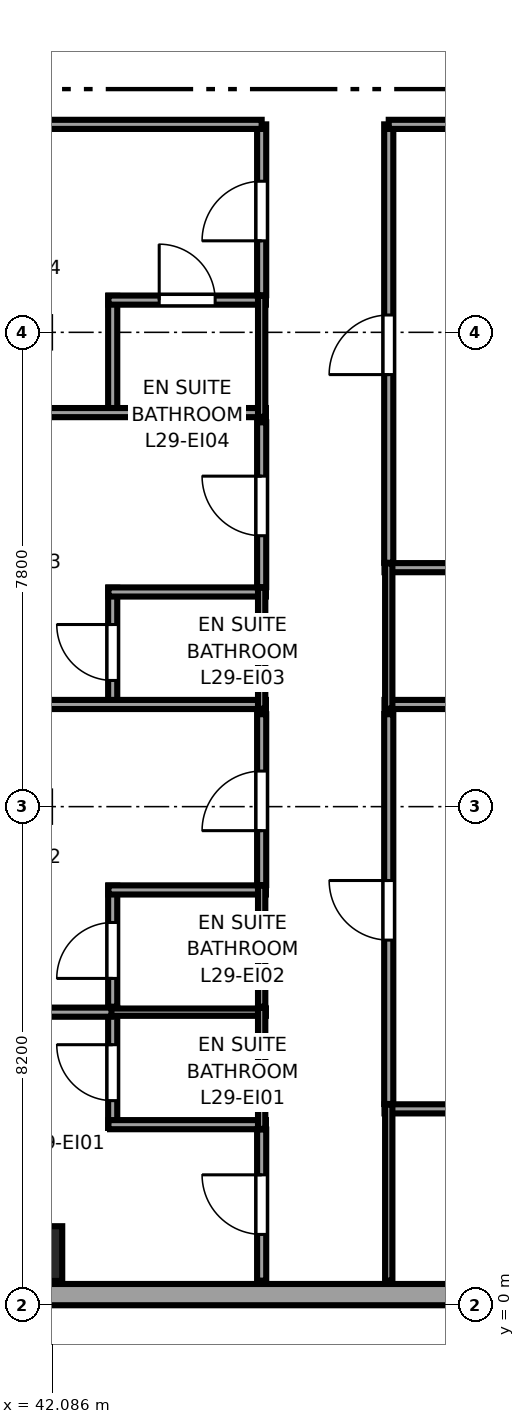
"""IFC4 building model, lengths in metres.
Left out: names, types, materials, properties, quantities, classifications, styles, units other than length and angle.
Written with IfcOpenShell. Run it as: python <this file> out.ifc"""

import sys

from ifc_helpers import new_model, si_unit, direction, frame, frame_2d, origin, origin_2d, place, context, subcontext, project, spatial, rectangle, extrude, source, transform, mapped, element, fill, save


model = new_model("IFC4")
c1 = context("Model", 3, precision=1e-05, world=origin(), true_north=direction((0.0, 1.0)))
c2 = subcontext(c1, "Body", "Model", "MODEL_VIEW")
j1 = project(units=[si_unit("LENGTHUNIT", "METRE"), si_unit("PLANEANGLEUNIT", "RADIAN")], contexts=[c1])
p1 = place(None, origin())
s1 = spatial("IfcSite", under=j1, at=p1, CompositionType="ELEMENT")
p2 = place(p1, origin())
s2 = spatial("IfcBuilding", under=s1, at=p2, CompositionType="ELEMENT")
p3 = place(p2, frame((0.0, 0.0, 115.1)))
s3 = spatial("IfcBuildingStorey", under=s2, at=p3, CompositionType="ELEMENT", Elevation=115.1)
m1 = source(origin(), c2, "Body", "SweptSolid", [
    extrude(rectangle(XDim=0.9, YDim=0.9, at=origin_2d()), origin(), (0.0, 0.0, 1.0), 3.55),
])
p4 = place(p3, frame((41.8, 0.85, 0.0), z_axis=(0.0, 0.0, 1.0), x_axis=(1.0, 0.0, 0.0)))
e1 = element("IfcColumn", 1, at=p4, inside=s3, PredefinedType="COLUMN", context=c2, shape_type="MappedRepresentation", body=[
    mapped(m1, transform((0.0, 0.0, 0.0), x_axis=(1.0, 0.0, 0.0), y_axis=(0.0, 1.0, 0.0), z_axis=(0.0, 0.0, 1.0), scale=1.0)),
])
p5 = place(p3, frame((34.375, 0.175, 0.0), z_axis=(0.0, 0.0, 1.0), x_axis=(1.0, 0.0, 0.0)))
e2 = element("IfcWall", 2, at=p5, inside=s3, PredefinedType="SOLIDWALL", context=c2, shape_type="SweptSolid", body=[
    extrude(rectangle(XDim=18.008, YDim=0.35, at=frame_2d((9.004, 0.0))), origin(), (0.0, 0.0, 1.0), 3.37),
])
p6 = place(p5, frame((1.801, 0.0, 0.68)))
e3 = element("IfcOpeningElement", 3, at=p6, cuts=e2, PredefinedType="OPENING", context=c2, shape_type="SweptSolid", body=[
    extrude(rectangle(XDim=1.8, YDim=1.85, at=frame_2d((0.9, 0.925))), frame((0.0, 0.185, 0.0), z_axis=(0.0, -1.0, 0.0), x_axis=(1.0, 0.0, 0.0)), (0.0, 0.0, 1.0), 0.37),
])
p7 = place(p5, frame((4.953, 0.0, 0.68)))
e4 = element("IfcOpeningElement", 4, at=p7, cuts=e2, PredefinedType="OPENING", context=c2, shape_type="SweptSolid", body=[
    extrude(rectangle(XDim=1.8, YDim=1.85, at=frame_2d((0.9, 0.925))), frame((0.0, 0.185, 0.0), z_axis=(0.0, -1.0, 0.0), x_axis=(1.0, 0.0, 0.0)), (0.0, 0.0, 1.0), 0.37),
])
p8 = place(p3, frame((43.08, 2.9, 0.0), z_axis=(0.0, 0.0, 1.0), x_axis=(0.0, 1.0, 0.0)))
e5 = element("IfcWall", 5, at=p8, inside=s3, PredefinedType="PARTITIONING", context=c2, shape_type="SweptSolid", body=[
    extrude(rectangle(XDim=1.99, YDim=0.15, at=frame_2d((0.995, 0.0))), origin(), (0.0, 0.0, 1.0), 3.37),
])
p9 = place(p8, frame((0.465, 0.0, 0.0)))
e6 = element("IfcOpeningElement", 6, at=p9, cuts=e5, PredefinedType="OPENING", context=c2, shape_type="SweptSolid", body=[
    extrude(rectangle(XDim=0.92, YDim=2.01, at=frame_2d((0.46, 1.005))), frame((0.0, 0.085, 0.0), z_axis=(0.0, -1.0, 0.0), x_axis=(1.0, 0.0, 0.0)), (0.0, 0.0, 1.0), 0.17),
])
p10 = place(p3, frame((43.01, 2.97, 0.0), z_axis=(0.0, 0.0, 1.0), x_axis=(1.0, 0.0, 0.0)))
e7 = element("IfcWall", 7, at=p10, inside=s3, PredefinedType="PARTITIONING", context=c2, shape_type="SweptSolid", body=[
    extrude(rectangle(XDim=2.59, YDim=0.15, at=frame_2d((1.295, 0.0))), origin(), (0.0, 0.0, 1.0), 3.37),
])
p11 = place(p3, frame((43.01, 4.82, 0.0), z_axis=(0.0, 0.0, 1.0), x_axis=(1.0, 0.0, 0.0)))
e8 = element("IfcWall", 8, at=p11, inside=s3, PredefinedType="PLUMBINGWALL", context=c2, shape_type="SweptSolid", body=[
    extrude(rectangle(XDim=2.59, YDim=0.12, at=frame_2d((1.295, 0.0))), origin(), (0.0, 0.0, 1.0), 3.37),
])
p12 = place(p3, frame((45.53, 2.9, 0.0), z_axis=(0.0, 0.0, 1.0), x_axis=(0.0, 1.0, 0.0)))
e9 = element("IfcWall", 9, at=p12, inside=s3, PredefinedType="PLUMBINGWALL", context=c2, shape_type="SweptSolid", body=[
    extrude(rectangle(XDim=1.99, YDim=0.12, at=frame_2d((0.995, 0.0))), origin(), (0.0, 0.0, 1.0), 3.37),
])
p13 = place(p3, frame((43.08, 4.91, 0.0), z_axis=(0.0, 0.0, 1.0), x_axis=(0.0, 1.0, 0.0)))
e10 = element("IfcWall", 10, at=p13, inside=s3, PredefinedType="PARTITIONING", context=c2, shape_type="SweptSolid", body=[
    extrude(rectangle(XDim=1.99, YDim=0.15, at=frame_2d((0.995, 0.0))), origin(), (0.0, 0.0, 1.0), 3.37),
])
p14 = place(p13, frame((0.465, 0.0, 0.0)))
e11 = element("IfcOpeningElement", 11, at=p14, cuts=e10, PredefinedType="OPENING", context=c2, shape_type="SweptSolid", body=[
    extrude(rectangle(XDim=0.92, YDim=2.01, at=frame_2d((0.46, 1.005))), frame((0.0, 0.085, 0.0), z_axis=(0.0, -1.0, 0.0), x_axis=(1.0, 0.0, 0.0)), (0.0, 0.0, 1.0), 0.17),
])
p15 = place(p3, frame((43.01, 6.83, 0.0), z_axis=(0.0, 0.0, 1.0), x_axis=(1.0, 0.0, 0.0)))
e12 = element("IfcWall", 12, at=p15, inside=s3, PredefinedType="PARTITIONING", context=c2, shape_type="SweptSolid", body=[
    extrude(rectangle(XDim=2.59, YDim=0.15, at=frame_2d((1.295, 0.0))), origin(), (0.0, 0.0, 1.0), 3.37),
])
p16 = place(p3, frame((45.53, 4.91, 0.0), z_axis=(0.0, 0.0, 1.0), x_axis=(0.0, 1.0, 0.0)))
e13 = element("IfcWall", 13, at=p16, inside=s3, PredefinedType="PLUMBINGWALL", context=c2, shape_type="SweptSolid", body=[
    extrude(rectangle(XDim=1.99, YDim=0.12, at=frame_2d((0.995, 0.0))), origin(), (0.0, 0.0, 1.0), 3.37),
])
p17 = place(p3, frame((43.08, 9.81, 0.0), z_axis=(0.0, 0.0, 1.0), x_axis=(0.0, 1.0, 0.0)))
e14 = element("IfcWall", 14, at=p17, inside=s3, PredefinedType="PARTITIONING", context=c2, shape_type="SweptSolid", body=[
    extrude(rectangle(XDim=1.99, YDim=0.15, at=frame_2d((0.995, 0.0))), origin(), (0.0, 0.0, 1.0), 3.37),
])
p18 = place(p17, frame((0.465, 0.0, 0.0)))
e15 = element("IfcOpeningElement", 15, at=p18, cuts=e14, PredefinedType="OPENING", context=c2, shape_type="SweptSolid", body=[
    extrude(rectangle(XDim=0.92, YDim=2.01, at=frame_2d((0.46, 1.005))), frame((0.0, 0.085, 0.0), z_axis=(0.0, -1.0, 0.0), x_axis=(1.0, 0.0, 0.0)), (0.0, 0.0, 1.0), 0.17),
])
p19 = place(p3, frame((34.65, 9.88, 0.0), z_axis=(0.0, 0.0, 1.0), x_axis=(1.0, 0.0, 0.0)))
e16 = element("IfcWall", 16, at=p19, inside=s3, PredefinedType="PARTITIONING", context=c2, shape_type="SweptSolid", body=[
    extrude(rectangle(XDim=10.95, YDim=0.15, at=frame_2d((5.475, 0.0))), origin(), (0.0, 0.0, 1.0), 3.37),
])
p20 = place(p3, frame((43.01, 11.73, 0.0), z_axis=(0.0, 0.0, 1.0), x_axis=(1.0, 0.0, 0.0)))
e17 = element("IfcWall", 17, at=p20, inside=s3, PredefinedType="PARTITIONING", context=c2, shape_type="SweptSolid", body=[
    extrude(rectangle(XDim=2.59, YDim=0.15, at=frame_2d((1.295, 0.0))), origin(), (0.0, 0.0, 1.0), 3.37),
])
p21 = place(p3, frame((45.53, 9.81, 0.0), z_axis=(0.0, 0.0, 1.0), x_axis=(0.0, 1.0, 0.0)))
e18 = element("IfcWall", 18, at=p21, inside=s3, PredefinedType="PLUMBINGWALL", context=c2, shape_type="SweptSolid", body=[
    extrude(rectangle(XDim=1.99, YDim=0.12, at=frame_2d((0.995, 0.0))), origin(), (0.0, 0.0, 1.0), 2.954),
])
p22 = place(p3, frame((43.08, 14.61, 0.0), z_axis=(0.0, 0.0, 1.0), x_axis=(0.0, 1.0, 0.0)))
e19 = element("IfcWall", 19, at=p22, inside=s3, PredefinedType="PARTITIONING", context=c2, shape_type="SweptSolid", body=[
    extrude(rectangle(XDim=1.99, YDim=0.15, at=frame_2d((0.995, 0.0))), origin(), (0.0, 0.0, 1.0), 3.37),
])
p23 = place(p3, frame((34.65, 14.68, 0.0), z_axis=(0.0, 0.0, 1.0), x_axis=(1.0, 0.0, 0.0)))
e20 = element("IfcWall", 20, at=p23, inside=s3, PredefinedType="PARTITIONING", context=c2, shape_type="SweptSolid", body=[
    extrude(rectangle(XDim=10.95, YDim=0.15, at=frame_2d((5.475, 0.0))), origin(), (0.0, 0.0, 1.0), 3.37),
])
p24 = place(p3, frame((43.01, 16.53, 0.0), z_axis=(0.0, 0.0, 1.0), x_axis=(1.0, 0.0, 0.0)))
e21 = element("IfcWall", 21, at=p24, inside=s3, PredefinedType="PARTITIONING", context=c2, shape_type="SweptSolid", body=[
    extrude(rectangle(XDim=2.59, YDim=0.15, at=frame_2d((1.295, 0.0))), origin(), (0.0, 0.0, 1.0), 3.37),
])
p25 = place(p24, frame((0.835, 0.0, 0.0)))
e22 = element("IfcOpeningElement", 22, at=p25, cuts=e21, PredefinedType="OPENING", context=c2, shape_type="SweptSolid", body=[
    extrude(rectangle(XDim=0.92, YDim=2.01, at=frame_2d((0.46, 1.005))), frame((0.0, 0.085, 0.0), z_axis=(0.0, -1.0, 0.0), x_axis=(1.0, 0.0, 0.0)), (0.0, 0.0, 1.0), 0.17),
])
p26 = place(p3, frame((45.53, 14.61, 0.0), z_axis=(0.0, 0.0, 1.0), x_axis=(0.0, 1.0, 0.0)))
e23 = element("IfcWall", 23, at=p26, inside=s3, PredefinedType="PLUMBINGWALL", context=c2, shape_type="SweptSolid", body=[
    extrude(rectangle(XDim=1.99, YDim=0.12, at=frame_2d((0.995, 0.0))), origin(), (0.0, 0.0, 1.0), 2.954),
])
p27 = place(p3, frame((47.55, 3.23, 0.0), z_axis=(0.0, 0.0, 1.0), x_axis=(1.0, 0.0, 0.0)))
e24 = element("IfcWall", 24, at=p27, inside=s3, PredefinedType="PARTITIONING", context=c2, shape_type="SweptSolid", body=[
    extrude(rectangle(XDim=3.74, YDim=0.15, at=frame_2d((1.87, 0.0))), origin(), (0.0, 0.0, 1.0), 3.37),
])
p28 = place(p3, frame((47.62, 0.405, 0.0), z_axis=(0.0, 0.0, 1.0), x_axis=(0.0, 1.0, 0.0)))
e25 = element("IfcWall", 25, at=p28, inside=s3, PredefinedType="PLUMBINGWALL", context=c2, shape_type="SweptSolid", body=[
    extrude(rectangle(XDim=2.895, YDim=0.12, at=frame_2d((1.448, 0.0))), origin(), (0.0, 0.0, 1.0), 3.37),
])
p29 = place(p3, frame((47.55, 9.88, 0.0), z_axis=(0.0, 0.0, 1.0), x_axis=(1.0, 0.0, 0.0)))
e26 = element("IfcWall", 26, at=p29, inside=s3, PredefinedType="PARTITIONING", context=c2, shape_type="SweptSolid", body=[
    extrude(rectangle(XDim=9.045, YDim=0.15, at=frame_2d((4.522, 0.0))), origin(), (0.0, 0.0, 1.0), 3.37),
])
p30 = place(p3, frame((47.55, 12.13, 0.0), z_axis=(0.0, 0.0, 1.0), x_axis=(1.0, 0.0, 0.0)))
e27 = element("IfcWall", 27, at=p30, inside=s3, PredefinedType="PARTITIONING", context=c2, shape_type="SweptSolid", body=[
    extrude(rectangle(XDim=2.59, YDim=0.15, at=frame_2d((1.295, 0.0))), origin(), (0.0, 0.0, 1.0), 3.37),
])
p31 = place(p3, frame((47.62, 9.81, 0.0), z_axis=(0.0, 0.0, 1.0), x_axis=(0.0, 1.0, 0.0)))
e28 = element("IfcWall", 28, at=p31, inside=s3, PredefinedType="PLUMBINGWALL", context=c2, shape_type="SweptSolid", body=[
    extrude(rectangle(XDim=2.39, YDim=0.12, at=frame_2d((1.195, 0.0))), origin(), (0.0, 0.0, 1.0), 3.37),
])
p32 = place(p3, frame((45.53, 0.405, 0.0), z_axis=(0.0, 0.0, 1.0), x_axis=(0.0, 1.0, 0.0)))
e29 = element("IfcWall", 29, at=p32, inside=s3, PredefinedType="PARTITIONING", context=c2, shape_type="SweptSolid", body=[
    extrude(rectangle(XDim=2.485, YDim=0.15, at=frame_2d((1.242, 0.0))), origin(), (0.0, 0.0, 1.0), 3.37),
])
p33 = place(p32, frame((0.76, 0.0, 0.0)))
e30 = element("IfcOpeningElement", 30, at=p33, cuts=e29, PredefinedType="OPENING", context=c2, shape_type="SweptSolid", body=[
    extrude(rectangle(XDim=0.98, YDim=2.12, at=frame_2d((0.49, 1.06))), frame((0.0, 0.085, 0.0), z_axis=(0.0, -1.0, 0.0), x_axis=(1.0, 0.0, 0.0)), (0.0, 0.0, 1.0), 0.17),
])
p34 = place(p3, frame((34.65, 4.82, 0.0), z_axis=(0.0, 0.0, 1.0), x_axis=(1.0, 0.0, 0.0)))
e31 = element("IfcWall", 31, at=p34, inside=s3, PredefinedType="PARTITIONING", context=c2, shape_type="SweptSolid", body=[
    extrude(rectangle(XDim=8.41, YDim=0.15, at=frame_2d((4.205, 0.0))), origin(), (0.0, 0.0, 1.0), 3.37),
])
p35 = place(p3, frame((45.53, 6.91, 0.0), z_axis=(0.0, 0.0, 1.0), x_axis=(0.0, 1.0, 0.0)))
e32 = element("IfcWall", 32, at=p35, inside=s3, PredefinedType="PARTITIONING", context=c2, shape_type="SweptSolid", body=[
    extrude(rectangle(XDim=2.81, YDim=0.15, at=frame_2d((1.405, 0.0))), origin(), (0.0, 0.0, 1.0), 2.954),
])
p36 = place(p35, frame((0.895, 0.0, 0.0)))
e33 = element("IfcOpeningElement", 33, at=p36, cuts=e32, PredefinedType="OPENING", context=c2, shape_type="SweptSolid", body=[
    extrude(rectangle(XDim=0.98, YDim=2.12, at=frame_2d((0.49, 1.06))), frame((0.0, 0.085, 0.0), z_axis=(0.0, -1.0, 0.0), x_axis=(1.0, 0.0, 0.0)), (0.0, 0.0, 1.0), 0.17),
])
p37 = place(p3, frame((45.53, 11.81, 0.0), z_axis=(0.0, 0.0, 1.0), x_axis=(0.0, 1.0, 0.0)))
e34 = element("IfcWall", 34, at=p37, inside=s3, PredefinedType="PARTITIONING", context=c2, shape_type="SweptSolid", body=[
    extrude(rectangle(XDim=2.71, YDim=0.15, at=frame_2d((1.355, 0.0))), origin(), (0.0, 0.0, 1.0), 2.954),
])
p38 = place(p37, frame((0.845, 0.0, 0.0)))
e35 = element("IfcOpeningElement", 35, at=p38, cuts=e34, PredefinedType="OPENING", context=c2, shape_type="SweptSolid", body=[
    extrude(rectangle(XDim=0.98, YDim=2.12, at=frame_2d((0.49, 1.06))), frame((0.0, 0.085, 0.0), z_axis=(0.0, -1.0, 0.0), x_axis=(1.0, 0.0, 0.0)), (0.0, 0.0, 1.0), 0.17),
])
p39 = place(p3, frame((45.53, 16.61, 0.0), z_axis=(0.0, 0.0, 1.0), x_axis=(0.0, 1.0, 0.0)))
e36 = element("IfcWall", 36, at=p39, inside=s3, PredefinedType="PARTITIONING", context=c2, shape_type="SweptSolid", body=[
    extrude(rectangle(XDim=2.81, YDim=0.15, at=frame_2d((1.405, 0.0))), origin(), (0.0, 0.0, 1.0), 2.954),
])
p40 = place(p39, frame((0.895, 0.0, 0.0)))
e37 = element("IfcOpeningElement", 37, at=p40, cuts=e36, PredefinedType="OPENING", context=c2, shape_type="SweptSolid", body=[
    extrude(rectangle(XDim=0.98, YDim=2.12, at=frame_2d((0.49, 1.06))), frame((0.0, 0.085, 0.0), z_axis=(0.0, -1.0, 0.0), x_axis=(1.0, 0.0, 0.0)), (0.0, 0.0, 1.0), 0.17),
])
p41 = place(p3, frame((34.65, 19.42, 0.0), z_axis=(0.0, 0.0, 1.0), x_axis=(1.0, 0.0, 0.0)))
e38 = element("IfcWall", 38, at=p41, inside=s3, PredefinedType="PARTITIONING", context=c2, shape_type="SweptSolid", body=[
    extrude(rectangle(XDim=10.88, YDim=0.15, at=frame_2d((5.44, 0.0))), origin(), (0.0, 0.0, 1.0), 3.37),
])
p42 = place(p3, frame((47.62, 3.31, 0.0), z_axis=(0.0, 0.0, 1.0), x_axis=(0.0, 1.0, 0.0)))
e39 = element("IfcWall", 39, at=p42, inside=s3, PredefinedType="PARTITIONING", context=c2, shape_type="SweptSolid", body=[
    extrude(rectangle(XDim=6.41, YDim=0.15, at=frame_2d((3.205, 0.0))), origin(), (0.0, 0.0, 1.0), 3.37),
])
p43 = place(p42, frame((2.695, 0.0, 0.0)))
e40 = element("IfcOpeningElement", 40, at=p43, cuts=e39, PredefinedType="OPENING", context=c2, shape_type="SweptSolid", body=[
    extrude(rectangle(XDim=0.98, YDim=2.12, at=frame_2d((0.49, 1.06))), frame((0.0, 0.085, 0.0), z_axis=(0.0, -1.0, 0.0), x_axis=(1.0, 0.0, 0.0)), (0.0, 0.0, 1.0), 0.17),
])
p44 = place(p3, frame((47.62, 12.21, 0.0), z_axis=(0.0, 0.0, 1.0), x_axis=(0.0, 1.0, 0.0)))
e41 = element("IfcWall", 41, at=p44, inside=s3, PredefinedType="PARTITIONING", context=c2, shape_type="SweptSolid", body=[
    extrude(rectangle(XDim=7.21, YDim=0.15, at=frame_2d((3.605, 0.0))), origin(), (0.0, 0.0, 1.0), 3.37),
])
p45 = place(p44, frame((3.095, 0.0, 0.0)))
e42 = element("IfcOpeningElement", 42, at=p45, cuts=e41, PredefinedType="OPENING", context=c2, shape_type="SweptSolid", body=[
    extrude(rectangle(XDim=0.98, YDim=2.12, at=frame_2d((0.49, 1.06))), frame((0.0, 0.085, 0.0), z_axis=(0.0, -1.0, 0.0), x_axis=(1.0, 0.0, 0.0)), (0.0, 0.0, 1.0), 0.17),
])
p46 = place(p3, frame((47.62, 19.42, 0.0), z_axis=(0.0, 0.0, 1.0), x_axis=(1.0, 0.0, 0.0)))
e43 = element("IfcWall", 43, at=p46, inside=s3, PredefinedType="PARTITIONING", context=c2, shape_type="SweptSolid", body=[
    extrude(rectangle(XDim=8.975, YDim=0.15, at=frame_2d((4.487, 0.0))), origin(), (0.0, 0.0, 1.0), 3.37),
])
m2 = source(origin(), c2, "Body", "SweptSolid", [
    extrude(rectangle(XDim=0.92, YDim=2.01, at=frame_2d((0.46, 1.005))), frame((0.0, 0.025, 0.0), z_axis=(0.0, -1.0, 0.0), x_axis=(1.0, 0.0, 0.0)), (0.0, 0.0, 1.0), 0.05),
])
p47 = place(p9, origin())
e44 = element("IfcDoor", 44, at=p47, inside=s3, OperationType="SINGLE_SWING_RIGHT", PredefinedType="DOOR", context=c2, shape_type="MappedRepresentation", body=[
    mapped(m2, transform((0.0, 0.0, 0.0), x_axis=(1.0, 0.0, 0.0), y_axis=(0.0, 1.0, 0.0), z_axis=(0.0, 0.0, 1.0), scale=1.0)),
])
fill(e6, e44)
p48 = place(p14, origin())
e45 = element("IfcDoor", 45, at=p48, inside=s3, OperationType="SINGLE_SWING_LEFT", PredefinedType="DOOR", context=c2, shape_type="MappedRepresentation", body=[
    mapped(m2, transform((0.0, 0.0, 0.0), x_axis=(1.0, 0.0, 0.0), y_axis=(0.0, 1.0, 0.0), z_axis=(0.0, 0.0, 1.0), scale=1.0)),
])
fill(e11, e45)
p49 = place(p18, origin())
e46 = element("IfcDoor", 46, at=p49, inside=s3, OperationType="SINGLE_SWING_RIGHT", PredefinedType="DOOR", context=c2, shape_type="MappedRepresentation", body=[
    mapped(m2, transform((0.0, 0.0, 0.0), x_axis=(1.0, 0.0, 0.0), y_axis=(0.0, 1.0, 0.0), z_axis=(0.0, 0.0, 1.0), scale=1.0)),
])
fill(e15, e46)
p50 = place(p25, origin())
e47 = element("IfcDoor", 47, at=p50, inside=s3, OperationType="SINGLE_SWING_LEFT", PredefinedType="DOOR", context=c2, shape_type="MappedRepresentation", body=[
    mapped(m2, transform((0.0, 0.0, 0.0), x_axis=(1.0, 0.0, 0.0), y_axis=(0.0, 1.0, 0.0), z_axis=(0.0, 0.0, 1.0), scale=1.0)),
])
fill(e22, e47)
m3 = source(origin(), c2, "Body", "SweptSolid", [
    extrude(rectangle(XDim=0.98, YDim=2.12, at=frame_2d((0.49, 1.06))), frame((0.0, 0.025, 0.0), z_axis=(0.0, -1.0, 0.0), x_axis=(1.0, 0.0, 0.0)), (0.0, 0.0, 1.0), 0.05),
])
p51 = place(p33, origin())
e48 = element("IfcDoor", 48, at=p51, inside=s3, OperationType="SINGLE_SWING_RIGHT", PredefinedType="DOOR", context=c2, shape_type="MappedRepresentation", body=[
    mapped(m3, transform((0.0, 0.0, 0.0), x_axis=(1.0, 0.0, 0.0), y_axis=(0.0, 1.0, 0.0), z_axis=(0.0, 0.0, 1.0), scale=1.0)),
])
fill(e30, e48)
p52 = place(p36, origin())
e49 = element("IfcDoor", 49, at=p52, inside=s3, OperationType="SINGLE_SWING_LEFT", PredefinedType="DOOR", context=c2, shape_type="MappedRepresentation", body=[
    mapped(m3, transform((0.0, 0.0, 0.0), x_axis=(1.0, 0.0, 0.0), y_axis=(0.0, 1.0, 0.0), z_axis=(0.0, 0.0, 1.0), scale=1.0)),
])
fill(e33, e49)
p53 = place(p38, origin())
e50 = element("IfcDoor", 50, at=p53, inside=s3, OperationType="SINGLE_SWING_RIGHT", PredefinedType="DOOR", context=c2, shape_type="MappedRepresentation", body=[
    mapped(m3, transform((0.0, 0.0, 0.0), x_axis=(1.0, 0.0, 0.0), y_axis=(0.0, 1.0, 0.0), z_axis=(0.0, 0.0, 1.0), scale=1.0)),
])
fill(e35, e50)
p54 = place(p40, origin())
e51 = element("IfcDoor", 51, at=p54, inside=s3, OperationType="SINGLE_SWING_LEFT", PredefinedType="DOOR", context=c2, shape_type="MappedRepresentation", body=[
    mapped(m3, transform((0.0, 0.0, 0.0), x_axis=(1.0, 0.0, 0.0), y_axis=(0.0, 1.0, 0.0), z_axis=(0.0, 0.0, 1.0), scale=1.0)),
])
fill(e37, e51)
p55 = place(p43, origin())
e52 = element("IfcDoor", 52, at=p55, inside=s3, OperationType="SINGLE_SWING_RIGHT", PredefinedType="DOOR", context=c2, shape_type="MappedRepresentation", body=[
    mapped(m3, transform((0.0, 0.0, 0.0), x_axis=(1.0, 0.0, 0.0), y_axis=(0.0, 1.0, 0.0), z_axis=(0.0, 0.0, 1.0), scale=1.0)),
])
fill(e40, e52)
p56 = place(p45, origin())
e53 = element("IfcDoor", 53, at=p56, inside=s3, OperationType="SINGLE_SWING_LEFT", PredefinedType="DOOR", context=c2, shape_type="MappedRepresentation", body=[
    mapped(m3, transform((0.0, 0.0, 0.0), x_axis=(1.0, 0.0, 0.0), y_axis=(0.0, 1.0, 0.0), z_axis=(0.0, 0.0, 1.0), scale=1.0)),
])
fill(e42, e53)
save(model, sys.argv[1])
